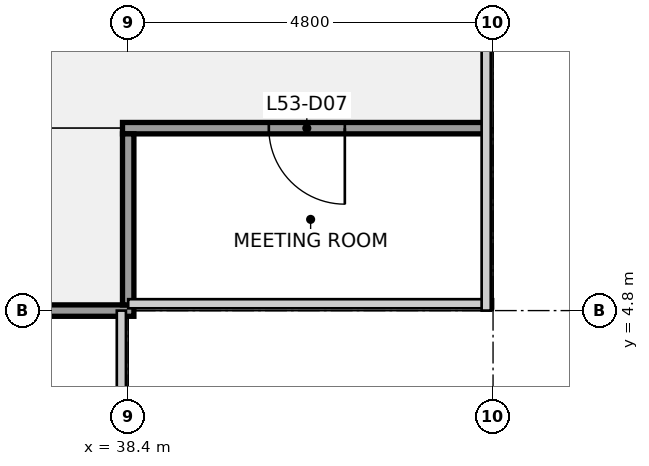
"""IFC4 building model, lengths in metres.
Left out: names, types, materials, properties, quantities, classifications, styles, units other than length and angle.
Written with IfcOpenShell. Run it as: python <this file> out.ifc"""

import sys

from ifc_helpers import new_model, si_unit, direction, frame, frame_2d, origin, place, context, subcontext, project, spatial, rectangle, extrude, element, fill, save


model = new_model("IFC4")
c1 = context("Model", 3, precision=1e-05, world=origin(), true_north=direction((0.0, 1.0)))
c2 = subcontext(c1, "Body", "Model", "MODEL_VIEW")
j1 = project(units=[si_unit("LENGTHUNIT", "METRE"), si_unit("PLANEANGLEUNIT", "RADIAN")], contexts=[c1])
p1 = place(None, origin())
s1 = spatial("IfcSite", under=j1, at=p1, CompositionType="ELEMENT")
p2 = place(p1, origin())
s2 = spatial("IfcBuilding", under=s1, at=p2, CompositionType="ELEMENT")
p3 = place(p2, frame((0.0, 0.0, 241.2)))
s3 = spatial("IfcBuildingStorey", under=s2, at=p3, CompositionType="ELEMENT", Elevation=241.2)
p4 = place(p3, frame((19.125, 4.8, 0.0), z_axis=(0.0, 0.0, 1.0), x_axis=(1.0, 0.0, 0.0)))
e1 = element("IfcWall", 1, at=p4, inside=s3, PredefinedType="PARTITIONING", context=c2, shape_type="SweptSolid", body=[
    extrude(rectangle(XDim=19.35, YDim=0.15, at=frame_2d((9.675, 0.0))), origin(), (0.0, 0.0, 1.0), 2.849),
])
p5 = place(p4, frame((4.375, 0.0, 0.0)))
e2 = element("IfcOpeningElement", 2, at=p5, cuts=e1, PredefinedType="OPENING", context=c2, shape_type="SweptSolid", body=[
    extrude(rectangle(XDim=1.0, YDim=2.1, at=frame_2d((0.5, 1.05))), frame((0.0, 0.085, 0.0), z_axis=(0.0, -1.0, 0.0), x_axis=(1.0, 0.0, 0.0)), (0.0, 0.0, 1.0), 0.17),
])
p6 = place(p4, frame((10.375, 0.0, 0.0)))
e3 = element("IfcOpeningElement", 3, at=p6, cuts=e1, PredefinedType="OPENING", context=c2, shape_type="SweptSolid", body=[
    extrude(rectangle(XDim=1.0, YDim=2.1, at=frame_2d((0.5, 1.05))), frame((0.0, 0.085, 0.0), z_axis=(0.0, -1.0, 0.0), x_axis=(1.0, 0.0, 0.0)), (0.0, 0.0, 1.0), 0.17),
])
p7 = place(p4, frame((15.175, 0.0, 0.0)))
e4 = element("IfcOpeningElement", 4, at=p7, cuts=e1, PredefinedType="OPENING", context=c2, shape_type="SweptSolid", body=[
    extrude(rectangle(XDim=1.0, YDim=2.1, at=frame_2d((0.5, 1.05))), frame((0.0, 0.085, 0.0), z_axis=(0.0, -1.0, 0.0), x_axis=(1.0, 0.0, 0.0)), (0.0, 0.0, 1.0), 0.17),
])
p8 = place(p3, frame((38.325, 7.2, 0.0), z_axis=(0.0, 0.0, 1.0), x_axis=(1.0, 0.0, 0.0)))
e5 = element("IfcWall", 5, at=p8, inside=s3, PredefinedType="PARTITIONING", context=c2, shape_type="SweptSolid", body=[
    extrude(rectangle(XDim=4.775, YDim=0.15, at=frame_2d((2.388, 0.0))), origin(), (0.0, 0.0, 1.0), 2.849),
])
p9 = place(p8, frame((1.925, 0.0, 0.0)))
e6 = element("IfcOpeningElement", 6, at=p9, cuts=e5, PredefinedType="OPENING", context=c2, shape_type="SweptSolid", body=[
    extrude(rectangle(XDim=1.0, YDim=2.1, at=frame_2d((0.5, 1.05))), frame((0.0, 0.085, 0.0), z_axis=(0.0, -1.0, 0.0), x_axis=(1.0, 0.0, 0.0)), (0.0, 0.0, 1.0), 0.17),
])
p10 = place(p3, frame((38.4, 4.875, 0.0), z_axis=(0.0, 0.0, 1.0), x_axis=(0.0, 1.0, 0.0)))
e7 = element("IfcWall", 7, at=p10, inside=s3, PredefinedType="PARTITIONING", context=c2, shape_type="SweptSolid", body=[
    extrude(rectangle(XDim=2.25, YDim=0.15, at=frame_2d((1.125, 0.0))), origin(), (0.0, 0.0, 1.0), 2.849),
])
p11 = place(p9, origin())
e8 = element("IfcDoor", 8, at=p11, inside=s3, OperationType="SINGLE_SWING_RIGHT", PredefinedType="DOOR", context=c2, shape_type="SweptSolid", body=[
    extrude(rectangle(XDim=1.0, YDim=2.1, at=frame_2d((0.5, 1.05))), frame((0.0, 0.025, 0.0), z_axis=(0.0, -1.0, 0.0), x_axis=(1.0, 0.0, 0.0)), (0.0, 0.0, 1.0), 0.05),
])
fill(e6, e8)
save(model, sys.argv[1])
